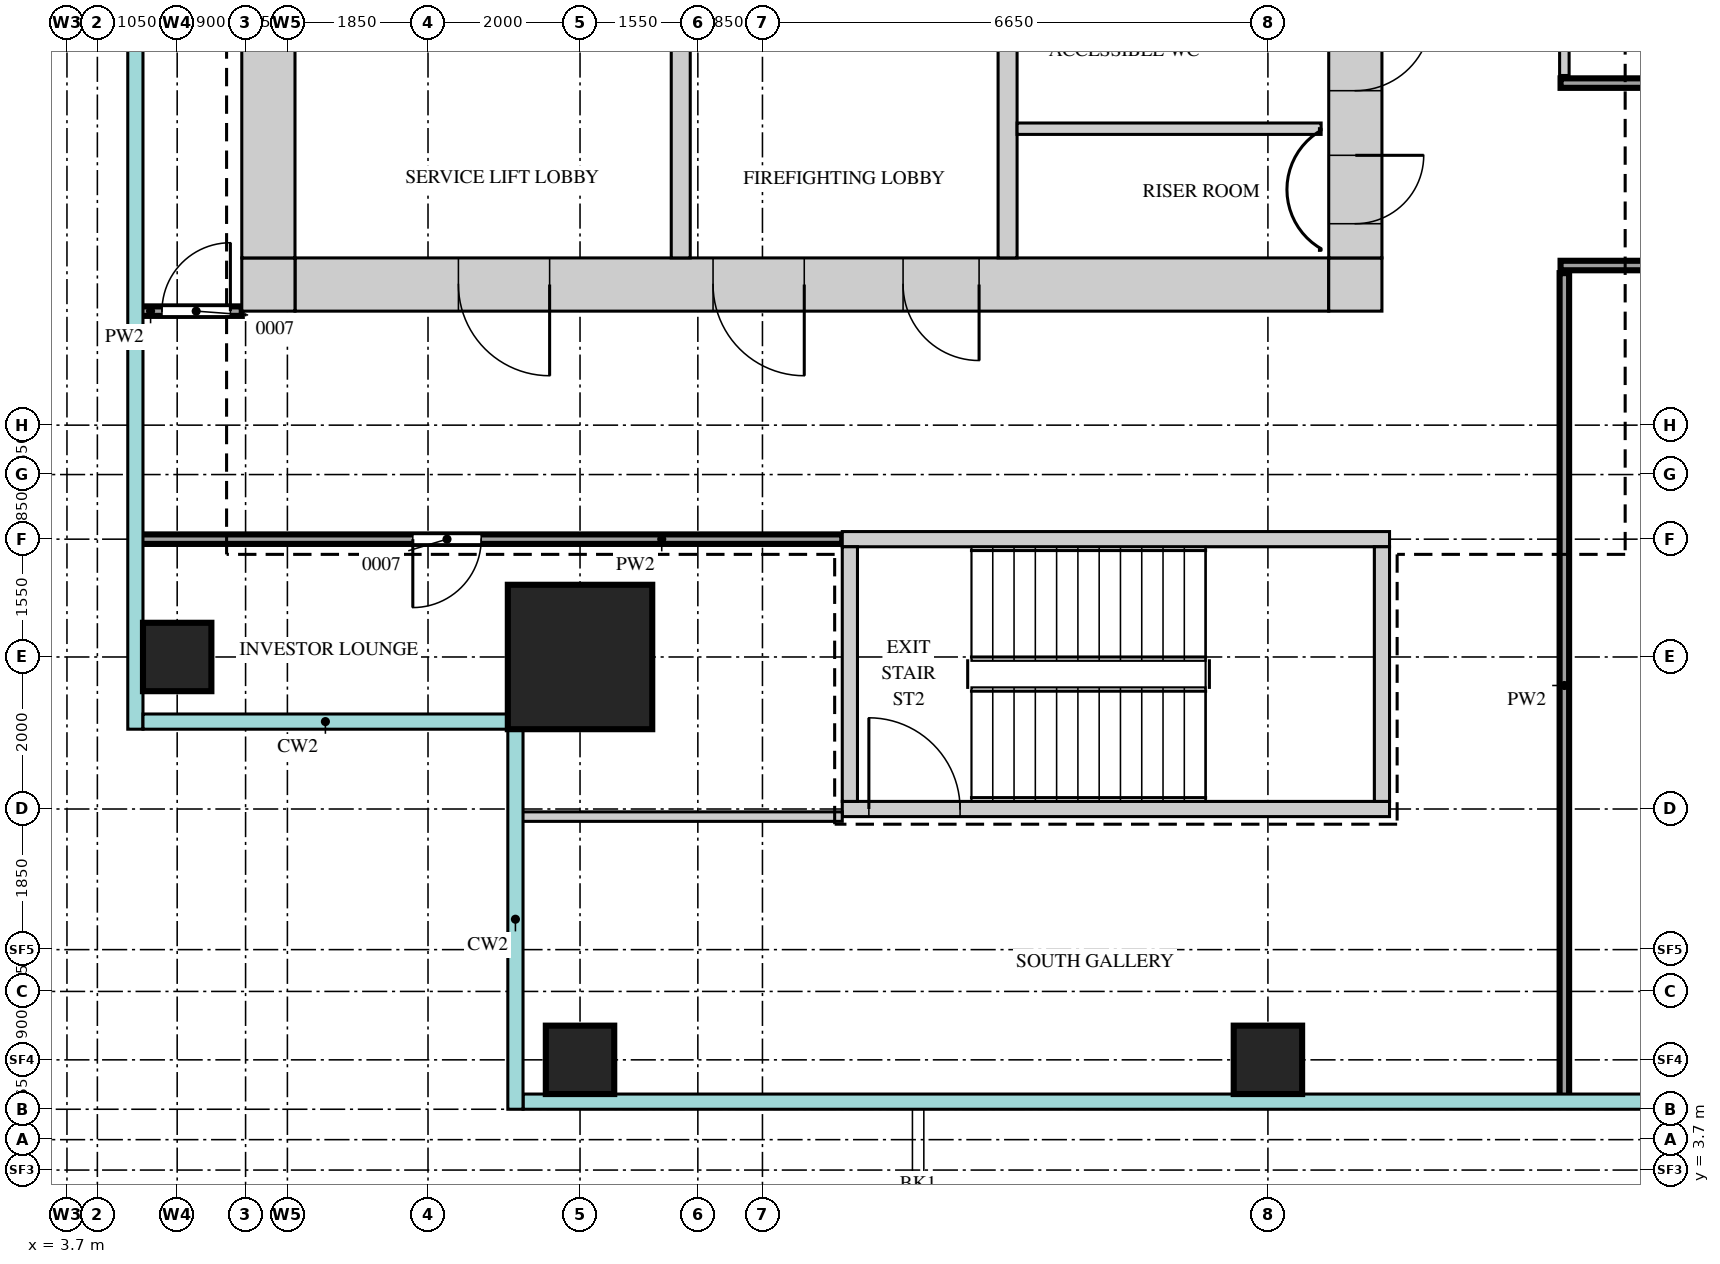
"""IFC4 building model, lengths in metres.
Left out: names, types, materials, properties, quantities, classifications, styles, units other than length and angle.
Written with IfcOpenShell. Run it as: python <this file> out.ifc"""

import sys

from ifc_helpers import new_model, si_unit, direction, frame, frame_2d, origin, origin_2d, place, context, subcontext, project, spatial, rectangle, extrude, source, transform, mapped, element, fill, save


model = new_model("IFC4")
c1 = context("Model", 3, precision=1e-05, world=origin(), true_north=direction((0.0, 1.0)))
c2 = subcontext(c1, "Body", "Model", "MODEL_VIEW")
j1 = project(units=[si_unit("LENGTHUNIT", "METRE"), si_unit("PLANEANGLEUNIT", "RADIAN")], contexts=[c1])
p1 = place(None, origin())
s1 = spatial("IfcSite", under=j1, at=p1, CompositionType="ELEMENT")
p2 = place(p1, origin())
s2 = spatial("IfcBuilding", under=s1, at=p2, CompositionType="ELEMENT")
p3 = place(p2, frame((0.0, 0.0, 242.2)))
s3 = spatial("IfcBuildingStorey", under=s2, at=p3, CompositionType="ELEMENT", Elevation=242.2)
m1 = source(origin(), c2, "Body", "SweptSolid", [
    extrude(rectangle(XDim=13.6, YDim=0.7, at=frame_2d((6.8, 0.0))), origin(), (0.0, 0.0, 1.0), 3.75),
])
p4 = place(p3, frame((6.7, 15.35, 0.0), z_axis=(0.0, 0.0, 1.0), x_axis=(1.0, 0.0, 0.0)))
e1 = element("IfcWall", 1, at=p4, inside=s3, PredefinedType="SHEAR", context=c2, shape_type="MappedRepresentation", body=[
    mapped(m1, transform((0.0, 0.0, 0.0))),
])
m2 = source(origin(), c2, "Body", "SweptSolid", [
    extrude(rectangle(XDim=1.2, YDim=2.1, at=frame_2d((0.6, 1.05))), frame((0.0, 0.36, 0.0), z_axis=(0.0, -1.0, 0.0), x_axis=(1.0, 0.0, 0.0)), (0.0, 0.0, 1.0), 0.72),
])
p5 = place(p4, frame((5.5, 0.0, 0.0)))
e2 = element("IfcOpeningElement", 2, at=p5, cuts=e1, PredefinedType="OPENING", context=c2, shape_type="MappedRepresentation", body=[
    mapped(m2, transform((0.0, 0.0, 0.0))),
])
p6 = place(p4, frame((2.15, 0.0, 0.0)))
e3 = element("IfcOpeningElement", 3, at=p6, cuts=e1, PredefinedType="OPENING", context=c2, shape_type="MappedRepresentation", body=[
    mapped(m2, transform((0.0, 0.0, 0.0))),
])
m3 = source(origin(), c2, "Body", "SweptSolid", [
    extrude(rectangle(XDim=1.0, YDim=2.1, at=frame_2d((0.5, 1.05))), frame((0.0, 0.36, 0.0), z_axis=(0.0, -1.0, 0.0), x_axis=(1.0, 0.0, 0.0)), (0.0, 0.0, 1.0), 0.72),
])
p7 = place(p4, frame((8.0, 0.0, 0.0)))
e4 = element("IfcOpeningElement", 4, at=p7, cuts=e1, PredefinedType="OPENING", context=c2, shape_type="MappedRepresentation", body=[
    mapped(m3, transform((0.0, 0.0, 0.0))),
])
m4 = source(origin(), c2, "Body", "SweptSolid", [
    extrude(rectangle(XDim=0.7, YDim=0.7, at=frame_2d((0.35, 0.0))), origin(), (0.0, 0.0, 1.0), 3.75),
])
for number, where, z_axis, x_axis in (
    (5, (20.3, 15.35, 0.0), (0.0, 0.0, 1.0), (1.0, 0.0, 0.0)),
    (6, (6.0, 15.35, 0.0), (0.0, 0.0, 1.0), (1.0, 0.0, 0.0)),
):
    element("IfcWall", number, at=place(p3, frame(where, z_axis=z_axis, x_axis=x_axis)), inside=s3, PredefinedType="SHEAR", context=c2, shape_type="MappedRepresentation", body=[
        mapped(m4, transform((0.0, 0.0, 0.0))),
    ])
m5 = source(origin(), c2, "Body", "SweptSolid", [
    extrude(rectangle(XDim=22.6, YDim=0.7, at=frame_2d((11.3, 0.0))), origin(), (0.0, 0.0, 1.0), 3.75),
])
p8 = place(p3, frame((20.65, 15.7, 0.0), z_axis=(0.0, 0.0, 1.0), x_axis=(0.0, 1.0, 0.0)))
e7 = element("IfcWall", 7, at=p8, inside=s3, PredefinedType="SHEAR", context=c2, shape_type="MappedRepresentation", body=[
    mapped(m5, transform((0.0, 0.0, 0.0))),
])
m6 = source(origin(), c2, "Body", "SweptSolid", [
    extrude(rectangle(XDim=1.8, YDim=2.1, at=frame_2d((0.9, 1.05))), frame((0.0, 0.36, 0.0), z_axis=(0.0, -1.0, 0.0), x_axis=(1.0, 0.0, 0.0)), (0.0, 0.0, 1.0), 0.72),
])
p9 = place(p8, frame((10.8, 0.0, 0.0)))
e8 = element("IfcOpeningElement", 8, at=p9, cuts=e7, PredefinedType="OPENING", context=c2, shape_type="MappedRepresentation", body=[
    mapped(m6, transform((0.0, 0.0, 0.0))),
])
m7 = source(origin(), c2, "Body", "SweptSolid", [
    extrude(rectangle(XDim=0.9, YDim=2.1, at=frame_2d((0.45, 1.05))), frame((0.0, 0.36, 0.0), z_axis=(0.0, -1.0, 0.0), x_axis=(1.0, 0.0, 0.0)), (0.0, 0.0, 1.0), 0.72),
])
p10 = place(p8, frame((0.45, 0.0, 0.0)))
e9 = element("IfcOpeningElement", 9, at=p10, cuts=e7, PredefinedType="OPENING", context=c2, shape_type="MappedRepresentation", body=[
    mapped(m7, transform((0.0, 0.0, 0.0))),
])
p11 = place(p8, frame((2.2, 0.0, 0.0)))
e10 = element("IfcOpeningElement", 10, at=p11, cuts=e7, PredefinedType="OPENING", context=c2, shape_type="MappedRepresentation", body=[
    mapped(m3, transform((0.0, 0.0, 0.0))),
])
p12 = place(p8, frame((5.0, 0.0, 0.0)))
e11 = element("IfcOpeningElement", 11, at=p12, cuts=e7, PredefinedType="OPENING", context=c2, shape_type="MappedRepresentation", body=[
    mapped(m7, transform((0.0, 0.0, 0.0))),
])
p13 = place(p3, frame((6.35, 15.7, 0.0), z_axis=(0.0, 0.0, 1.0), x_axis=(0.0, 1.0, 0.0)))
e12 = element("IfcWall", 12, at=p13, inside=s3, PredefinedType="SHEAR", context=c2, shape_type="MappedRepresentation", body=[
    mapped(m5, transform((0.0, 0.0, 0.0))),
])
m8 = source(origin(), c2, "Body", "SweptSolid", [
    extrude(rectangle(XDim=7.2, YDim=0.2, at=frame_2d((3.6, 0.0))), origin(), (0.0, 0.0, 1.0), 3.75),
])
p14 = place(p3, frame((13.9, 12.0, 0.0), z_axis=(0.0, 0.0, 1.0), x_axis=(1.0, 0.0, 0.0)))
e13 = element("IfcWall", 13, at=p14, inside=s3, PredefinedType="SHEAR", context=c2, shape_type="MappedRepresentation", body=[
    mapped(m8, transform((0.0, 0.0, 0.0))),
])
p15 = place(p3, frame((13.9, 8.45, 0.0), z_axis=(0.0, 0.0, 1.0), x_axis=(1.0, 0.0, 0.0)))
e14 = element("IfcWall", 14, at=p15, inside=s3, PredefinedType="SHEAR", context=c2, shape_type="MappedRepresentation", body=[
    mapped(m8, transform((0.0, 0.0, 0.0))),
])
m9 = source(origin(), c2, "Body", "SweptSolid", [
    extrude(rectangle(XDim=1.2, YDim=2.1, at=frame_2d((0.6, 1.05))), frame((0.0, 0.11, 0.0), z_axis=(0.0, -1.0, 0.0), x_axis=(1.0, 0.0, 0.0)), (0.0, 0.0, 1.0), 0.22),
])
p16 = place(p15, frame((0.35, 0.0, 0.0)))
e15 = element("IfcOpeningElement", 15, at=p16, cuts=e14, PredefinedType="OPENING", context=c2, shape_type="MappedRepresentation", body=[
    mapped(m9, transform((0.0, 0.0, 0.0))),
])
m10 = source(origin(), c2, "Body", "SweptSolid", [
    extrude(rectangle(XDim=3.35, YDim=0.2, at=frame_2d((1.675, 0.0))), origin(), (0.0, 0.0, 1.0), 3.75),
])
for number, where, z_axis, x_axis in (
    (16, (21.0, 8.55, 0.0), (0.0, 0.0, 1.0), (0.0, 1.0, 0.0)),
    (17, (14.0, 8.55, 0.0), (0.0, 0.0, 1.0), (0.0, 1.0, 0.0)),
):
    element("IfcWall", number, at=place(p3, frame(where, z_axis=z_axis, x_axis=x_axis)), inside=s3, PredefinedType="SHEAR", context=c2, shape_type="MappedRepresentation", body=[
        mapped(m10, transform((0.0, 0.0, 0.0))),
    ])
m11 = source(origin(), c2, "Body", "SweptSolid", [
    extrude(rectangle(XDim=3.5, YDim=0.25, at=frame_2d((1.75, 0.0))), origin(), (0.0, 0.0, 1.0), 3.75),
])
for number, where, z_axis, x_axis in (
    (18, (16.075, 15.7, 0.0), (0.0, 0.0, 1.0), (0.0, 1.0, 0.0)),
    (19, (11.775, 15.7, 0.0), (0.0, 0.0, 1.0), (0.0, 1.0, 0.0)),
):
    element("IfcWall", number, at=place(p3, frame(where, z_axis=z_axis, x_axis=x_axis)), inside=s3, PredefinedType="STANDARD", context=c2, shape_type="MappedRepresentation", body=[
        mapped(m11, transform((0.0, 0.0, 0.0))),
    ])
m12 = source(origin(), c2, "Body", "SweptSolid", [
    extrude(rectangle(XDim=1.9, YDim=1.9, at=origin_2d()), origin(), (0.0, 0.0, 1.0), 4.0),
])
p17 = place(p3, frame((10.45, 10.45, 0.0), z_axis=(0.0, 0.0, 1.0), x_axis=(1.0, 0.0, 0.0)))
e20 = element("IfcColumn", 20, at=p17, inside=s3, PredefinedType="COLUMN", context=c2, shape_type="MappedRepresentation", body=[
    mapped(m12, transform((0.0, 0.0, 0.0))),
])
m13 = source(origin(), c2, "Body", "SweptSolid", [
    extrude(rectangle(XDim=0.9, YDim=0.9, at=origin_2d()), origin(), (0.0, 0.0, 1.0), 3.75),
])
for number, where, z_axis, x_axis in (
    (21, (10.45, 5.15, 0.0), (0.0, 0.0, 1.0), (1.0, 0.0, 0.0)),
    (22, (19.5, 5.15, 0.0), (0.0, 0.0, 1.0), (1.0, 0.0, 0.0)),
    (23, (5.15, 10.45, 0.0), (0.0, 0.0, 1.0), (1.0, 0.0, 0.0)),
):
    element("IfcColumn", number, at=place(p3, frame(where, z_axis=z_axis, x_axis=x_axis)), inside=s3, PredefinedType="COLUMN", context=c2, shape_type="MappedRepresentation", body=[
        mapped(m13, transform((0.0, 0.0, 0.0))),
    ])
m14 = source(origin(), c2, "Body", "SweptSolid", [
    extrude(rectangle(XDim=10.85, YDim=0.125, at=frame_2d((5.425, 0.0))), origin(), (0.0, 0.0, 1.0), 3.8),
])
p18 = place(p3, frame((23.4, 4.65, 0.0), z_axis=(0.0, 0.0, 1.0), x_axis=(0.0, 1.0, 0.0)))
e24 = element("IfcWall", 24, at=p18, inside=s3, PredefinedType="PARTITIONING", context=c2, shape_type="MappedRepresentation", body=[
    mapped(m14, transform((0.0, 0.0, 0.0))),
])
m15 = source(origin(), c2, "Body", "SweptSolid", [
    extrude(rectangle(XDim=4.25, YDim=0.125, at=frame_2d((2.125, 0.0))), origin(), (0.0, 0.0, 1.0), 3.8),
])
p19 = place(p3, frame((9.65, 8.35, 0.0), z_axis=(0.0, 0.0, 1.0), x_axis=(1.0, 0.0, 0.0)))
e25 = element("IfcWall", 25, at=p19, inside=s3, PredefinedType="PARTITIONING", context=c2, shape_type="MappedRepresentation", body=[
    mapped(m15, transform((0.0, 0.0, 0.0))),
])
m16 = source(origin(), c2, "Body", "SweptSolid", [
    extrude(rectangle(XDim=9.25, YDim=0.125, at=frame_2d((4.625, 0.0))), origin(), (0.0, 0.0, 1.0), 3.8),
])
p20 = place(p3, frame((4.65, 12.0, 0.0), z_axis=(0.0, 0.0, 1.0), x_axis=(1.0, 0.0, 0.0)))
e26 = element("IfcWall", 26, at=p20, inside=s3, PredefinedType="PARTITIONING", context=c2, shape_type="MappedRepresentation", body=[
    mapped(m16, transform((0.0, 0.0, 0.0))),
])
m17 = source(origin(), c2, "Body", "SweptSolid", [
    extrude(rectangle(XDim=0.9, YDim=2.1, at=frame_2d((0.45, 1.05))), frame((0.0, 0.073, 0.0), z_axis=(0.0, -1.0, 0.0), x_axis=(1.0, 0.0, 0.0)), (0.0, 0.0, 1.0), 0.145),
])
p21 = place(p20, frame((3.6, 0.0, 0.0)))
e27 = element("IfcOpeningElement", 27, at=p21, cuts=e26, PredefinedType="OPENING", context=c2, shape_type="MappedRepresentation", body=[
    mapped(m17, transform((0.0, 0.0, 0.0))),
])
m18 = source(origin(), c2, "Body", "SweptSolid", [
    extrude(rectangle(XDim=1.35, YDim=0.125, at=frame_2d((0.675, 0.0))), origin(), (0.0, 0.0, 1.0), 3.8),
])
p22 = place(p3, frame((4.65, 15.0, 0.0), z_axis=(0.0, 0.0, 1.0), x_axis=(1.0, 0.0, 0.0)))
e28 = element("IfcWall", 28, at=p22, inside=s3, PredefinedType="PARTITIONING", context=c2, shape_type="MappedRepresentation", body=[
    mapped(m18, transform((0.0, 0.0, 0.0))),
])
p23 = place(p22, frame((0.3, 0.0, 0.0)))
e29 = element("IfcOpeningElement", 29, at=p23, cuts=e28, PredefinedType="OPENING", context=c2, shape_type="MappedRepresentation", body=[
    mapped(m17, transform((0.0, 0.0, 0.0))),
])
m19 = source(origin(), c2, "Body", "SweptSolid", [
    extrude(rectangle(XDim=26.0, YDim=0.125, at=frame_2d((13.0, 0.0))), origin(), (0.0, 0.0, 1.0), 3.8),
])
p24 = place(p3, frame((23.35, 15.6, 0.0), z_axis=(0.0, 0.0, 1.0), x_axis=(1.0, 0.0, 0.0)))
e30 = element("IfcWall", 30, at=p24, inside=s3, PredefinedType="PARTITIONING", context=c2, shape_type="MappedRepresentation", body=[
    mapped(m19, transform((0.0, 0.0, 0.0))),
])
m20 = source(origin(), c2, "Body", "SweptSolid", [
    extrude(rectangle(XDim=1.2, YDim=2.1, at=frame_2d((0.6, 1.05))), frame((0.0, 0.073, 0.0), z_axis=(0.0, -1.0, 0.0), x_axis=(1.0, 0.0, 0.0)), (0.0, 0.0, 1.0), 0.145),
])
p25 = place(p24, frame((5.0, 0.0, 0.0)))
e31 = element("IfcOpeningElement", 31, at=p25, cuts=e30, PredefinedType="OPENING", context=c2, shape_type="MappedRepresentation", body=[
    mapped(m20, transform((0.0, 0.0, 0.0))),
])
p26 = place(p24, frame((15.1, 0.0, 0.0)))
e32 = element("IfcOpeningElement", 32, at=p26, cuts=e30, PredefinedType="OPENING", context=c2, shape_type="MappedRepresentation", body=[
    mapped(m17, transform((0.0, 0.0, 0.0))),
])
p27 = place(p24, frame((22.6, 0.0, 0.0)))
e33 = element("IfcOpeningElement", 33, at=p27, cuts=e30, PredefinedType="OPENING", context=c2, shape_type="MappedRepresentation", body=[
    mapped(m17, transform((0.0, 0.0, 0.0))),
])
m21 = source(origin(), c2, "Body", "SweptSolid", [
    extrude(rectangle(XDim=4.0, YDim=0.15, at=frame_2d((2.0, 0.0))), origin(), (0.0, 0.0, 1.0), 3.8),
])
p28 = place(p3, frame((16.2, 17.4, 0.0), z_axis=(0.0, 0.0, 1.0), x_axis=(1.0, 0.0, 0.0)))
e34 = element("IfcWall", 34, at=p28, inside=s3, PredefinedType="PARTITIONING", context=c2, shape_type="MappedRepresentation", body=[
    mapped(m21, transform((0.0, 0.0, 0.0))),
])
p29 = place(p3, frame((23.35, 18.0, 0.0), z_axis=(0.0, 0.0, 1.0), x_axis=(1.0, 0.0, 0.0)))
e35 = element("IfcWall", 35, at=p29, inside=s3, PredefinedType="PARTITIONING", context=c2, shape_type="MappedRepresentation", body=[
    mapped(m19, transform((0.0, 0.0, 0.0))),
])
p30 = place(p29, frame((4.05, 0.0, 0.0)))
e36 = element("IfcOpeningElement", 36, at=p30, cuts=e35, PredefinedType="OPENING", context=c2, shape_type="MappedRepresentation", body=[
    mapped(m17, transform((0.0, 0.0, 0.0))),
])
m22 = source(origin(), c2, "Body", "SweptSolid", [
    extrude(rectangle(XDim=1.0, YDim=2.1, at=frame_2d((0.5, 1.05))), frame((0.0, 0.073, 0.0), z_axis=(0.0, -1.0, 0.0), x_axis=(1.0, 0.0, 0.0)), (0.0, 0.0, 1.0), 0.145),
])
p31 = place(p29, frame((7.4, 0.0, 0.0)))
e37 = element("IfcOpeningElement", 37, at=p31, cuts=e35, PredefinedType="OPENING", context=c2, shape_type="MappedRepresentation", body=[
    mapped(m22, transform((0.0, 0.0, 0.0))),
])
p32 = place(p29, frame((12.55, 0.0, 0.0)))
e38 = element("IfcOpeningElement", 38, at=p32, cuts=e35, PredefinedType="OPENING", context=c2, shape_type="MappedRepresentation", body=[
    mapped(m17, transform((0.0, 0.0, 0.0))),
])
p33 = place(p29, frame((20.8, 0.0, 0.0)))
e39 = element("IfcOpeningElement", 39, at=p33, cuts=e35, PredefinedType="OPENING", context=c2, shape_type="MappedRepresentation", body=[
    mapped(m17, transform((0.0, 0.0, 0.0))),
])
m23 = source(origin(), c2, "Body", "SweptSolid", [
    extrude(rectangle(XDim=6.8, YDim=0.125, at=frame_2d((3.4, 0.0))), origin(), (0.0, 0.0, 1.0), 3.8),
])
p34 = place(p3, frame((23.4, 18.1, 0.0), z_axis=(0.0, 0.0, 1.0), x_axis=(0.0, 1.0, 0.0)))
e40 = element("IfcWall", 40, at=p34, inside=s3, PredefinedType="PARTITIONING", context=c2, shape_type="MappedRepresentation", body=[
    mapped(m23, transform((0.0, 0.0, 0.0))),
])
p35 = place(p34, frame((2.8, 0.0, 0.0)))
e41 = element("IfcOpeningElement", 41, at=p35, cuts=e40, PredefinedType="OPENING", context=c2, shape_type="MappedRepresentation", body=[
    mapped(m17, transform((0.0, 0.0, 0.0))),
])
m24 = source(origin(), c2, "Body", "SweptSolid", [
    extrude(rectangle(XDim=0.9, YDim=2.1, at=frame_2d((0.45, 1.05))), frame((0.0, 0.3, 0.0), z_axis=(0.0, -1.0, 0.0), x_axis=(1.0, 0.0, 0.0)), (0.0, 0.0, 1.0), 0.6),
])
p36 = place(p10, origin())
e42 = element("IfcDoor", 42, at=p36, inside=s3, OperationType="SINGLE_SWING_RIGHT", PredefinedType="DOOR", context=c2, shape_type="MappedRepresentation", body=[
    mapped(m24, transform((0.0, 0.0, 0.0))),
])
fill(e9, e42)
m25 = source(origin(), c2, "Body", "SweptSolid", [
    extrude(rectangle(XDim=1.0, YDim=2.1, at=frame_2d((0.5, 1.05))), frame((0.0, 0.3, 0.0), z_axis=(0.0, -1.0, 0.0), x_axis=(1.0, 0.0, 0.0)), (0.0, 0.0, 1.0), 0.6),
])
p37 = place(p11, origin())
e43 = element("IfcDoor", 43, at=p37, inside=s3, OperationType="SINGLE_SWING_RIGHT", PredefinedType="DOOR", context=c2, shape_type="MappedRepresentation", body=[
    mapped(m25, transform((0.0, 0.0, 0.0))),
])
fill(e10, e43)
m26 = source(origin(), c2, "Body", "SweptSolid", [
    extrude(rectangle(XDim=1.2, YDim=2.1, at=frame_2d((0.6, 1.05))), frame((0.0, 0.3, 0.0), z_axis=(0.0, -1.0, 0.0), x_axis=(1.0, 0.0, 0.0)), (0.0, 0.0, 1.0), 0.6),
])
p38 = place(p5, origin())
e44 = element("IfcDoor", 44, at=p38, inside=s3, OperationType="SINGLE_SWING_RIGHT", PredefinedType="DOOR", context=c2, shape_type="MappedRepresentation", body=[
    mapped(m26, transform((0.0, 0.0, 0.0))),
])
fill(e2, e44)
p39 = place(p6, origin())
e45 = element("IfcDoor", 45, at=p39, inside=s3, OperationType="SINGLE_SWING_RIGHT", PredefinedType="DOOR", context=c2, shape_type="MappedRepresentation", body=[
    mapped(m26, transform((0.0, 0.0, 0.0))),
])
fill(e3, e45)
p40 = place(p7, origin())
e46 = element("IfcDoor", 46, at=p40, inside=s3, OperationType="SINGLE_SWING_RIGHT", PredefinedType="DOOR", context=c2, shape_type="MappedRepresentation", body=[
    mapped(m25, transform((0.0, 0.0, 0.0))),
])
fill(e4, e46)
m27 = source(origin(), c2, "Body", "SweptSolid", [
    extrude(rectangle(XDim=0.9, YDim=2.1, at=frame_2d((0.45, 1.05))), frame((0.0, 0.025, 0.0), z_axis=(0.0, -1.0, 0.0), x_axis=(1.0, 0.0, 0.0)), (0.0, 0.0, 1.0), 0.05),
])
p41 = place(p23, origin())
e47 = element("IfcDoor", 47, at=p41, inside=s3, OperationType="SINGLE_SWING_LEFT", PredefinedType="DOOR", context=c2, shape_type="MappedRepresentation", body=[
    mapped(m27, transform((0.0, 0.0, 0.0))),
])
fill(e29, e47)
p42 = place(p21, origin())
e48 = element("IfcDoor", 48, at=p42, inside=s3, OperationType="SINGLE_SWING_LEFT", PredefinedType="DOOR", context=c2, shape_type="MappedRepresentation", body=[
    mapped(m27, transform((0.0, 0.0, 0.0))),
])
fill(e27, e48)
m28 = source(origin(), c2, "Body", "SweptSolid", [
    extrude(rectangle(XDim=1.2, YDim=2.1, at=frame_2d((0.6, 1.05))), frame((0.0, 0.025, 0.0), z_axis=(0.0, -1.0, 0.0), x_axis=(1.0, 0.0, 0.0)), (0.0, 0.0, 1.0), 0.05),
])
p43 = place(p16, origin())
e49 = element("IfcDoor", 49, at=p43, inside=s3, OperationType="SINGLE_SWING_RIGHT", PredefinedType="DOOR", context=c2, shape_type="MappedRepresentation", body=[
    mapped(m28, transform((0.0, 0.0, 0.0))),
])
fill(e15, e49)
save(model, sys.argv[1])
